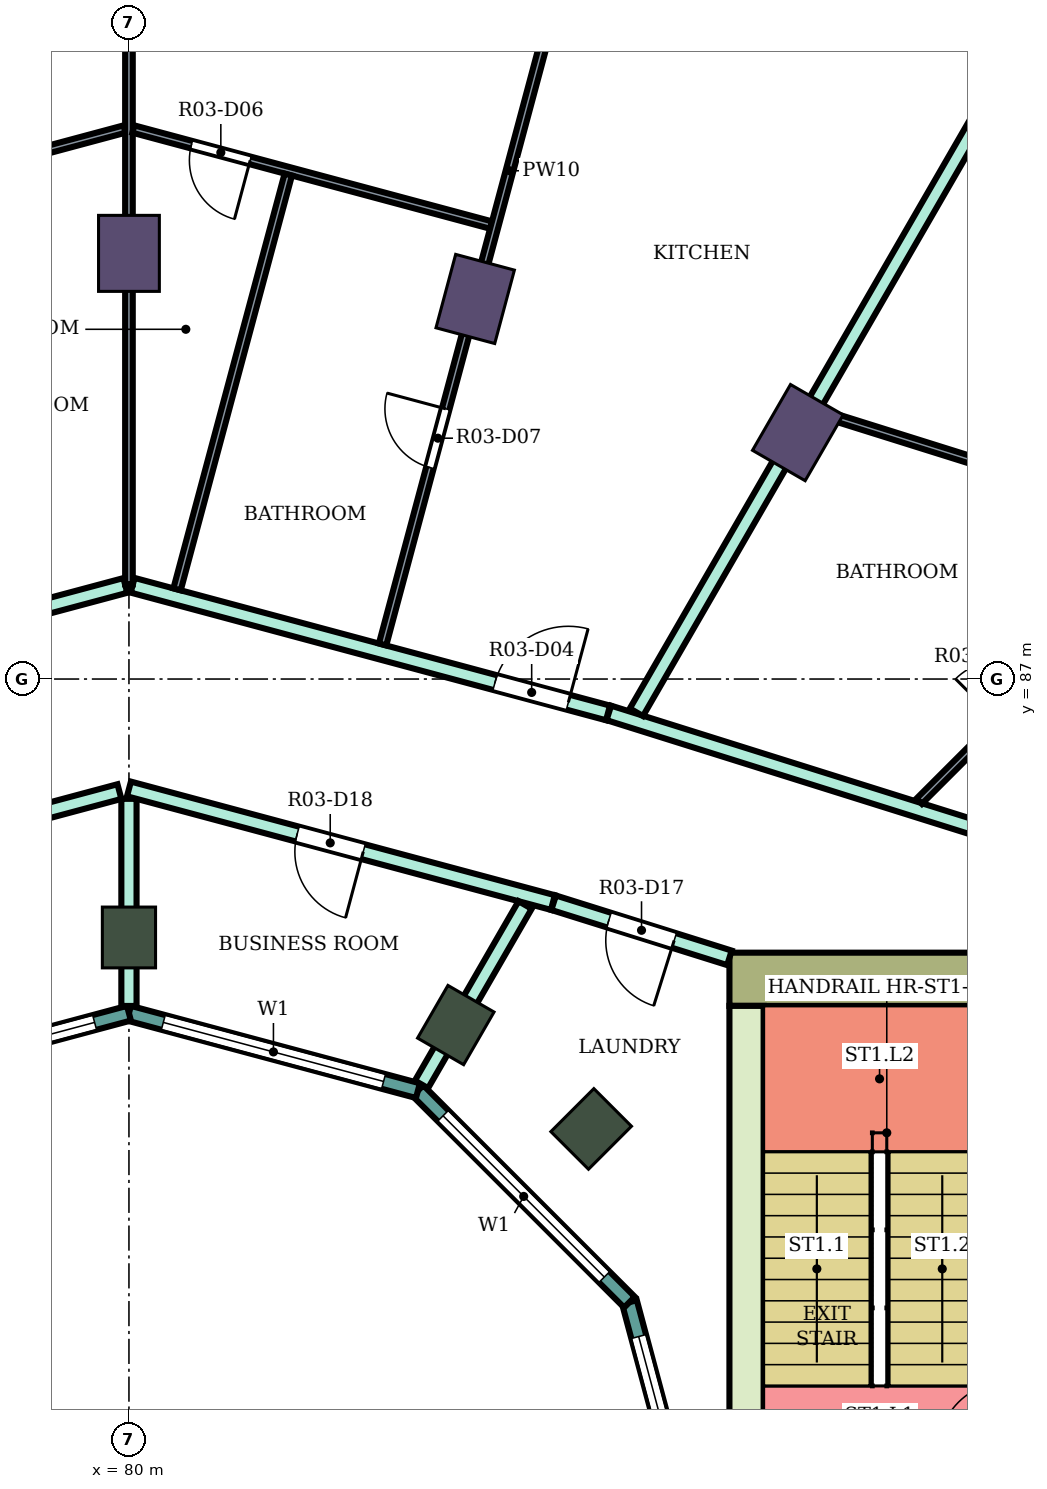
"""IFC4 building model, lengths in metres.
Left out: names, types, materials, properties, quantities, classifications, styles, units other than length and angle.
Written with IfcOpenShell. Run it as: python <this file> out.ifc"""

import sys

from ifc_helpers import new_model, si_unit, direction, frame, frame_2d, origin, origin_2d, place, context, subcontext, project, spatial, rectangle, extrude, element, fill, save


model = new_model("IFC4")
c1 = context("Model", 3, precision=1e-05, world=origin(), true_north=direction((0.0, 1.0)))
c2 = subcontext(c1, "Body", "Model", "MODEL_VIEW")
j1 = project(units=[si_unit("LENGTHUNIT", "METRE"), si_unit("PLANEANGLEUNIT", "RADIAN")], contexts=[c1])
p1 = place(None, origin())
s1 = spatial("IfcSite", under=j1, at=p1, CompositionType="ELEMENT")
p2 = place(p1, origin())
s2 = spatial("IfcBuilding", under=s1, at=p2, CompositionType="ELEMENT")
p3 = place(p2, frame((0.0, 0.0, 190.5)))
s3 = spatial("IfcBuildingStorey", under=s2, at=p3, CompositionType="ELEMENT", Elevation=190.5)
for number, where, z_axis, x_axis in (
    (1, (88.8, 90.242, 0.0), (0.0, 0.0, 1.0), (0.5, 0.866, 0.0)),
    (2, (84.555, 92.0, 0.0), (0.0, 0.0, 1.0), (0.259, 0.966, 0.0)),
    (3, (80.0, 92.6, 0.0), (0.0, 0.0, 1.0), (0.0, 1.0, 0.0)),
):
    element("IfcColumn", number, at=place(p3, frame(where, z_axis=z_axis, x_axis=x_axis)), inside=s3, PredefinedType="COLUMN", context=c2, shape_type="SweptSolid", body=[
        extrude(rectangle(XDim=1.0, YDim=0.8, at=origin_2d()), origin(), (0.0, 0.0, 1.0), 4.1),
    ])
for number, where, z_axis, x_axis in (
    (4, (86.081, 81.081, 0.0), (0.0, 0.0, 1.0), (0.707, 0.707, 0.0)),
    (5, (84.3, 82.448, 0.0), (0.0, 0.0, 1.0), (0.5, 0.866, 0.0)),
    (6, (80.0, 83.6, 0.0), (0.0, 0.0, 1.0), (0.0, 1.0, 0.0)),
):
    element("IfcColumn", number, at=place(p3, frame(where, z_axis=z_axis, x_axis=x_axis)), inside=s3, PredefinedType="COLUMN", context=c2, shape_type="SweptSolid", body=[
        extrude(rectangle(XDim=0.8, YDim=0.7, at=origin_2d()), origin(), (0.0, 0.0, 1.0), 4.1),
    ])
p4 = place(p3, frame((87.9, 83.05, 0.0), z_axis=(0.0, 0.0, 1.0), x_axis=(1.0, 0.0, 0.0)))
e7 = element("IfcWall", 7, at=p4, inside=s3, PredefinedType="SHEAR", context=c2, shape_type="SweptSolid", body=[
    extrude(rectangle(XDim=14.8, YDim=0.7, at=frame_2d((7.4, 0.0))), origin(), (0.0, 0.0, 1.0), 3.78),
])
p5 = place(p4, frame((4.2, 0.0, 0.0)))
e8 = element("IfcOpeningElement", 8, at=p5, cuts=e7, PredefinedType="OPENING", context=c2, shape_type="SweptSolid", body=[
    extrude(rectangle(XDim=2.4, YDim=2.4, at=frame_2d((1.2, 1.2))), frame((0.0, 0.36, 0.0), z_axis=(0.0, -1.0, 0.0), x_axis=(1.0, 0.0, 0.0)), (0.0, 0.0, 1.0), 0.72),
])
p6 = place(p3, frame((88.125, 75.0, 0.0), z_axis=(0.0, 0.0, 1.0), x_axis=(0.0, 1.0, 0.0)))
e9 = element("IfcWall", 9, at=p6, inside=s3, PredefinedType="SHEAR", context=c2, shape_type="SweptSolid", body=[
    extrude(rectangle(XDim=7.7, YDim=0.45, at=frame_2d((3.85, 0.0))), origin(), (0.0, 0.0, 1.0), 3.78),
])
p7 = place(p3, frame((87.604, 75.0, 0.0), z_axis=(0.0, 0.0, 1.0), x_axis=(-0.258789828301, 0.965933654434, 0.0)))
e10 = element("IfcWall", 10, at=p7, inside=s3, PredefinedType="NOTDEFINED", context=c2, shape_type="SweptSolid", body=[
    extrude(rectangle(XDim=3.936, YDim=0.2, at=frame_2d((1.968, 0.0))), origin(), (0.0, 0.0, 1.0), 4.1),
])
p8 = place(p7, frame((0.468, 0.0, 0.9)))
e11 = element("IfcOpeningElement", 11, at=p8, cuts=e10, PredefinedType="OPENING", context=c2, shape_type="SweptSolid", body=[
    extrude(rectangle(XDim=3.0, YDim=2.3, at=frame_2d((1.5, 1.15))), frame((0.0, 0.11, 0.0), z_axis=(0.0, -1.0, 0.0), x_axis=(1.0, 0.0, 0.0)), (0.0, 0.0, 1.0), 0.22),
])
p9 = place(p3, frame((86.585, 78.802, 0.0), z_axis=(0.0, 0.0, 1.0), x_axis=(-0.707106781187, 0.707106781187, 0.0)))
e12 = element("IfcWall", 12, at=p9, inside=s3, PredefinedType="NOTDEFINED", context=c2, shape_type="SweptSolid", body=[
    extrude(rectangle(XDim=3.936, YDim=0.2, at=frame_2d((1.968, 0.0))), origin(), (0.0, 0.0, 1.0), 4.1),
])
p10 = place(p9, frame((0.468, 0.0, 0.9)))
e13 = element("IfcOpeningElement", 13, at=p10, cuts=e12, PredefinedType="OPENING", context=c2, shape_type="SweptSolid", body=[
    extrude(rectangle(XDim=3.0, YDim=2.3, at=frame_2d((1.5, 1.15))), frame((0.0, 0.11, 0.0), z_axis=(0.0, -1.0, 0.0), x_axis=(1.0, 0.0, 0.0)), (0.0, 0.0, 1.0), 0.22),
])
p11 = place(p3, frame((83.802, 81.585, 0.0), z_axis=(0.0, 0.0, 1.0), x_axis=(-0.965933654434, 0.258789828301, 0.0)))
e14 = element("IfcWall", 14, at=p11, inside=s3, PredefinedType="NOTDEFINED", context=c2, shape_type="SweptSolid", body=[
    extrude(rectangle(XDim=3.936, YDim=0.2, at=frame_2d((1.968, 0.0))), origin(), (0.0, 0.0, 1.0), 4.1),
])
p12 = place(p11, frame((0.468, 0.0, 0.9)))
e15 = element("IfcOpeningElement", 15, at=p12, cuts=e14, PredefinedType="OPENING", context=c2, shape_type="SweptSolid", body=[
    extrude(rectangle(XDim=3.0, YDim=2.3, at=frame_2d((1.5, 1.15))), frame((0.0, 0.11, 0.0), z_axis=(0.0, -1.0, 0.0), x_axis=(1.0, 0.0, 0.0)), (0.0, 0.0, 1.0), 0.22),
])
p13 = place(p3, frame((80.0, 82.604, 0.0), z_axis=(0.0, 0.0, 1.0), x_axis=(-0.965933654434, -0.258789828301, 0.0)))
e16 = element("IfcWall", 16, at=p13, inside=s3, PredefinedType="NOTDEFINED", context=c2, shape_type="SweptSolid", body=[
    extrude(rectangle(XDim=3.936, YDim=0.2, at=frame_2d((1.968, 0.0))), origin(), (0.0, 0.0, 1.0), 4.1),
])
p14 = place(p13, frame((0.468, 0.0, 0.9)))
e17 = element("IfcOpeningElement", 17, at=p14, cuts=e16, PredefinedType="OPENING", context=c2, shape_type="SweptSolid", body=[
    extrude(rectangle(XDim=3.0, YDim=2.3, at=frame_2d((1.5, 1.15))), frame((0.0, 0.11, 0.0), z_axis=(0.0, -1.0, 0.0), x_axis=(1.0, 0.0, 0.0)), (0.0, 0.0, 1.0), 0.22),
])
p15 = place(p3, frame((73.687, 86.554, 0.0), z_axis=(0.0, 0.0, 1.0), x_axis=(0.965992724769, 0.258569247387, 0.0)))
e18 = element("IfcWall", 18, at=p15, inside=s3, PredefinedType="PARTITIONING", context=c2, shape_type="SweptSolid", body=[
    extrude(rectangle(XDim=6.486, YDim=0.2, at=frame_2d((3.243, 0.0))), origin(), (0.0, 0.0, 1.0), 3.65),
])
p16 = place(p15, frame((0.214, 0.0, 0.0)))
e19 = element("IfcOpeningElement", 19, at=p16, cuts=e18, PredefinedType="OPENING", context=c2, shape_type="SweptSolid", body=[
    extrude(rectangle(XDim=1.0, YDim=2.1, at=frame_2d((0.5, 1.05))), frame((0.0, 0.11, 0.0), z_axis=(0.0, -1.0, 0.0), x_axis=(1.0, 0.0, 0.0)), (0.0, 0.0, 1.0), 0.22),
])
p17 = place(p3, frame((74.413, 84.057, 0.0), z_axis=(0.0, 0.0, 1.0), x_axis=(0.965972135939, 0.258646153246, 0.0)))
e20 = element("IfcWall", 20, at=p17, inside=s3, PredefinedType="PARTITIONING", context=c2, shape_type="SweptSolid", body=[
    extrude(rectangle(XDim=5.654, YDim=0.2, at=frame_2d((2.827, 0.0))), origin(), (0.0, 0.0, 1.0), 3.65),
])
p18 = place(p17, frame((2.593, 0.0, 0.0)))
e21 = element("IfcOpeningElement", 21, at=p18, cuts=e20, PredefinedType="OPENING", context=c2, shape_type="SweptSolid", body=[
    extrude(rectangle(XDim=0.9, YDim=2.1, at=frame_2d((0.45, 1.05))), frame((0.0, 0.11, 0.0), z_axis=(0.0, -1.0, 0.0), x_axis=(1.0, 0.0, 0.0)), (0.0, 0.0, 1.0), 0.22),
])
p19 = place(p3, frame((80.0, 82.699, 0.0), z_axis=(0.0, 0.0, 1.0), x_axis=(0.0, 1.0, 0.0)))
e22 = element("IfcWall", 22, at=p19, inside=s3, PredefinedType="PARTITIONING", context=c2, shape_type="SweptSolid", body=[
    extrude(rectangle(XDim=2.725, YDim=0.2, at=frame_2d((1.363, 0.0))), origin(), (0.0, 0.0, 1.0), 3.65),
])
p20 = place(p3, frame((80.0, 85.554, 0.0), z_axis=(0.0, 0.0, 1.0), x_axis=(0.965928989968, -0.258807237802, 0.0)))
e23 = element("IfcWall", 23, at=p20, inside=s3, PredefinedType="PARTITIONING", context=c2, shape_type="SweptSolid", body=[
    extrude(rectangle(XDim=5.774, YDim=0.2, at=frame_2d((2.887, 0.0))), origin(), (0.0, 0.0, 1.0), 3.65),
])
p21 = place(p20, frame((2.292, 0.0, 0.0)))
e24 = element("IfcOpeningElement", 24, at=p21, cuts=e23, PredefinedType="OPENING", context=c2, shape_type="SweptSolid", body=[
    extrude(rectangle(XDim=0.9, YDim=2.1, at=frame_2d((0.45, 1.05))), frame((0.0, 0.11, 0.0), z_axis=(0.0, -1.0, 0.0), x_axis=(1.0, 0.0, 0.0)), (0.0, 0.0, 1.0), 0.22),
])
p22 = place(p3, frame((80.048, 88.233, 0.0), z_axis=(0.0, 0.0, 1.0), x_axis=(0.965787353661, -0.259335280109, 0.0)))
e25 = element("IfcWall", 25, at=p22, inside=s3, PredefinedType="PARTITIONING", context=c2, shape_type="SweptSolid", body=[
    extrude(rectangle(XDim=6.476, YDim=0.2, at=frame_2d((3.238, 0.0))), origin(), (0.0, 0.0, 1.0), 3.65),
])
p23 = place(p22, frame((4.936, 0.0, 0.0)))
e26 = element("IfcOpeningElement", 26, at=p23, cuts=e25, PredefinedType="OPENING", context=c2, shape_type="SweptSolid", body=[
    extrude(rectangle(XDim=1.0, YDim=2.1, at=frame_2d((0.5, 1.05))), frame((0.0, 0.11, 0.0), z_axis=(0.0, -1.0, 0.0), x_axis=(1.0, 0.0, 0.0)), (0.0, 0.0, 1.0), 0.22),
])
p24 = place(p3, frame((83.849, 81.667, 0.0), z_axis=(0.0, 0.0, 1.0), x_axis=(0.500117899823, 0.865957323588, 0.0)))
e27 = element("IfcWall", 27, at=p24, inside=s3, PredefinedType="PARTITIONING", context=c2, shape_type="SweptSolid", body=[
    extrude(rectangle(XDim=2.725, YDim=0.2, at=frame_2d((1.363, 0.0))), origin(), (0.0, 0.0, 1.0), 3.65),
])
p25 = place(p3, frame((85.587, 84.057, 0.0), z_axis=(0.0, 0.0, 1.0), x_axis=(0.954239513179, -0.299043393987, 0.0)))
e28 = element("IfcWall", 28, at=p25, inside=s3, PredefinedType="PARTITIONING", context=c2, shape_type="SweptSolid", body=[
    extrude(rectangle(XDim=2.424, YDim=0.2, at=frame_2d((1.212, 0.0))), origin(), (0.0, 0.0, 1.0), 3.65),
])
p26 = place(p25, frame((0.762, 0.0, 0.0)))
e29 = element("IfcOpeningElement", 29, at=p26, cuts=e28, PredefinedType="OPENING", context=c2, shape_type="SweptSolid", body=[
    extrude(rectangle(XDim=0.9, YDim=2.1, at=frame_2d((0.45, 1.05))), frame((0.0, 0.11, 0.0), z_axis=(0.0, -1.0, 0.0), x_axis=(1.0, 0.0, 0.0)), (0.0, 0.0, 1.0), 0.22),
])
p27 = place(p3, frame((86.313, 86.554, 0.0), z_axis=(0.0, 0.0, 1.0), x_axis=(0.954081217458, -0.299548043717, 0.0)))
e30 = element("IfcWall", 30, at=p27, inside=s3, PredefinedType="PARTITIONING", context=c2, shape_type="SweptSolid", body=[
    extrude(rectangle(XDim=5.721, YDim=0.2, at=frame_2d((2.86, 0.0))), origin(), (0.0, 0.0, 1.0), 3.65),
])
p28 = place(p3, frame((86.676, 86.563, 0.0), z_axis=(0.0, 0.0, 1.0), x_axis=(0.500130524836, 0.865950032119, 0.0)))
e31 = element("IfcWall", 31, at=p28, inside=s3, PredefinedType="PARTITIONING", context=c2, shape_type="SweptSolid", body=[
    extrude(rectangle(XDim=12.446, YDim=0.2, at=frame_2d((6.223, 0.0))), origin(), (0.0, 0.0, 1.0), 3.65),
])
p29 = place(p3, frame((75.295, 92.989, 0.0), z_axis=(0.0, 0.0, 1.0), x_axis=(0.965829517501, 0.259178207271, 0.0)))
e32 = element("IfcWall", 32, at=p29, inside=s3, PredefinedType="PARTITIONING", context=c2, shape_type="SweptSolid", body=[
    extrude(rectangle(XDim=4.812, YDim=0.1, at=frame_2d((2.406, 0.0))), origin(), (0.0, 0.0, 1.0), 3.65),
])
p30 = place(p29, frame((1.981, 0.0, 0.0)))
e33 = element("IfcOpeningElement", 33, at=p30, cuts=e32, PredefinedType="OPENING", context=c2, shape_type="SweptSolid", body=[
    extrude(rectangle(XDim=0.8, YDim=2.1, at=frame_2d((0.4, 1.05))), frame((0.0, 0.06, 0.0), z_axis=(0.0, -1.0, 0.0), x_axis=(1.0, 0.0, 0.0)), (0.0, 0.0, 1.0), 0.12),
])
p31 = place(p3, frame((80.0, 88.246, 0.0), z_axis=(0.0, 0.0, 1.0), x_axis=(0.0, 1.0, 0.0)))
e34 = element("IfcWall", 34, at=p31, inside=s3, PredefinedType="PARTITIONING", context=c2, shape_type="SweptSolid", body=[
    extrude(rectangle(XDim=9.954, YDim=0.1, at=frame_2d((4.977, 0.0))), origin(), (0.0, 0.0, 1.0), 3.65),
])
p32 = place(p31, frame((7.354, 0.0, 0.0)))
e35 = element("IfcOpeningElement", 35, at=p32, cuts=e34, PredefinedType="OPENING", context=c2, shape_type="SweptSolid", body=[
    extrude(rectangle(XDim=0.9, YDim=2.1, at=frame_2d((0.45, 1.05))), frame((0.0, 0.06, 0.0), z_axis=(0.0, -1.0, 0.0), x_axis=(1.0, 0.0, 0.0)), (0.0, 0.0, 1.0), 0.12),
])
p33 = place(p3, frame((80.058, 94.235, 0.0), z_axis=(0.0, 0.0, 1.0), x_axis=(0.965831212389, -0.259171891173, 0.0)))
e36 = element("IfcWall", 36, at=p33, inside=s3, PredefinedType="PARTITIONING", context=c2, shape_type="SweptSolid", body=[
    extrude(rectangle(XDim=4.872, YDim=0.1, at=frame_2d((2.436, 0.0))), origin(), (0.0, 0.0, 1.0), 3.65),
])
p34 = place(p33, frame((0.792, 0.0, 0.0)))
e37 = element("IfcOpeningElement", 37, at=p34, cuts=e36, PredefinedType="OPENING", context=c2, shape_type="SweptSolid", body=[
    extrude(rectangle(XDim=0.8, YDim=2.1, at=frame_2d((0.4, 1.05))), frame((0.0, 0.06, 0.0), z_axis=(0.0, -1.0, 0.0), x_axis=(1.0, 0.0, 0.0)), (0.0, 0.0, 1.0), 0.12),
])
p35 = place(p3, frame((80.633, 88.18, 0.0), z_axis=(0.0, 0.0, 1.0), x_axis=(0.25898304477, 0.965881867788, 0.0)))
e38 = element("IfcWall", 38, at=p35, inside=s3, PredefinedType="PARTITIONING", context=c2, shape_type="SweptSolid", body=[
    extrude(rectangle(XDim=5.65, YDim=0.1, at=frame_2d((2.825, 0.0))), origin(), (0.0, 0.0, 1.0), 3.65),
])
p36 = place(p3, frame((83.337, 87.455, 0.0), z_axis=(0.0, 0.0, 1.0), x_axis=(0.258861232071, 0.965914521337, 0.0)))
e39 = element("IfcWall", 39, at=p36, inside=s3, PredefinedType="PARTITIONING", context=c2, shape_type="SweptSolid", body=[
    extrude(rectangle(XDim=12.904, YDim=0.1, at=frame_2d((6.452, 0.0))), origin(), (0.0, 0.0, 1.0), 3.65),
])
p37 = place(p36, frame((9.227, 0.0, 0.0)))
e40 = element("IfcOpeningElement", 40, at=p37, cuts=e39, PredefinedType="OPENING", context=c2, shape_type="SweptSolid", body=[
    extrude(rectangle(XDim=0.9, YDim=2.1, at=frame_2d((0.45, 1.05))), frame((0.0, 0.06, 0.0), z_axis=(0.0, -1.0, 0.0), x_axis=(1.0, 0.0, 0.0)), (0.0, 0.0, 1.0), 0.12),
])
p38 = place(p36, frame((2.409, 0.0, 0.0)))
e41 = element("IfcOpeningElement", 41, at=p38, cuts=e39, PredefinedType="OPENING", context=c2, shape_type="SweptSolid", body=[
    extrude(rectangle(XDim=0.8, YDim=2.1, at=frame_2d((0.4, 1.05))), frame((0.0, 0.06, 0.0), z_axis=(0.0, -1.0, 0.0), x_axis=(1.0, 0.0, 0.0)), (0.0, 0.0, 1.0), 0.12),
])
p39 = place(p3, frame((89.078, 90.508, 0.0), z_axis=(0.0, 0.0, 1.0), x_axis=(0.954199699612, -0.299170408398, 0.0)))
e42 = element("IfcWall", 42, at=p39, inside=s3, PredefinedType="PARTITIONING", context=c2, shape_type="SweptSolid", body=[
    extrude(rectangle(XDim=5.06, YDim=0.1, at=frame_2d((2.53, 0.0))), origin(), (0.0, 0.0, 1.0), 3.65),
])
p40 = place(p3, frame((90.397, 85.393, 0.0), z_axis=(0.0, 0.0, 1.0), x_axis=(0.707264750546, 0.706948776529, 0.0)))
e43 = element("IfcWall", 43, at=p40, inside=s3, PredefinedType="PARTITIONING", context=c2, shape_type="SweptSolid", body=[
    extrude(rectangle(XDim=8.499, YDim=0.1, at=frame_2d((4.25, 0.0))), origin(), (0.0, 0.0, 1.0), 3.65),
])
p41 = place(p40, frame((5.857, 0.0, 0.0)))
e44 = element("IfcOpeningElement", 44, at=p41, cuts=e43, PredefinedType="OPENING", context=c2, shape_type="SweptSolid", body=[
    extrude(rectangle(XDim=0.9, YDim=2.1, at=frame_2d((0.45, 1.05))), frame((0.0, 0.06, 0.0), z_axis=(0.0, -1.0, 0.0), x_axis=(1.0, 0.0, 0.0)), (0.0, 0.0, 1.0), 0.12),
])
p42 = place(p40, frame((1.476, 0.0, 0.0)))
e45 = element("IfcOpeningElement", 45, at=p42, cuts=e43, PredefinedType="OPENING", context=c2, shape_type="SweptSolid", body=[
    extrude(rectangle(XDim=0.8, YDim=2.1, at=frame_2d((0.4, 1.05))), frame((0.0, 0.06, 0.0), z_axis=(0.0, -1.0, 0.0), x_axis=(1.0, 0.0, 0.0)), (0.0, 0.0, 1.0), 0.12),
])
p43 = place(p8, origin())
e46 = element("IfcWindow", 46, at=p43, inside=s3, PartitioningType="SINGLE_PANEL", PredefinedType="WINDOW", context=c2, shape_type="SweptSolid", body=[
    extrude(rectangle(XDim=3.0, YDim=2.3, at=frame_2d((1.5, 1.15))), frame((0.0, 0.03, 0.0), z_axis=(0.0, -1.0, 0.0), x_axis=(1.0, 0.0, 0.0)), (0.0, 0.0, 1.0), 0.06),
])
fill(e11, e46)
p44 = place(p10, origin())
e47 = element("IfcWindow", 47, at=p44, inside=s3, PartitioningType="SINGLE_PANEL", PredefinedType="WINDOW", context=c2, shape_type="SweptSolid", body=[
    extrude(rectangle(XDim=3.0, YDim=2.3, at=frame_2d((1.5, 1.15))), frame((0.0, 0.03, 0.0), z_axis=(0.0, -1.0, 0.0), x_axis=(1.0, 0.0, 0.0)), (0.0, 0.0, 1.0), 0.06),
])
fill(e13, e47)
p45 = place(p12, origin())
e48 = element("IfcWindow", 48, at=p45, inside=s3, PartitioningType="SINGLE_PANEL", PredefinedType="WINDOW", context=c2, shape_type="SweptSolid", body=[
    extrude(rectangle(XDim=3.0, YDim=2.3, at=frame_2d((1.5, 1.15))), frame((0.0, 0.03, 0.0), z_axis=(0.0, -1.0, 0.0), x_axis=(1.0, 0.0, 0.0)), (0.0, 0.0, 1.0), 0.06),
])
fill(e15, e48)
p46 = place(p14, origin())
e49 = element("IfcWindow", 49, at=p46, inside=s3, PartitioningType="SINGLE_PANEL", PredefinedType="WINDOW", context=c2, shape_type="SweptSolid", body=[
    extrude(rectangle(XDim=3.0, YDim=2.3, at=frame_2d((1.5, 1.15))), frame((0.0, 0.03, 0.0), z_axis=(0.0, -1.0, 0.0), x_axis=(1.0, 0.0, 0.0)), (0.0, 0.0, 1.0), 0.06),
])
fill(e17, e49)
p47 = place(p23, origin())
e50 = element("IfcDoor", 50, at=p47, inside=s3, OperationType="SINGLE_SWING_RIGHT", PredefinedType="DOOR", context=c2, shape_type="SweptSolid", body=[
    extrude(rectangle(XDim=1.0, YDim=2.1, at=frame_2d((0.5, 1.05))), frame((0.0, 0.025, 0.0), z_axis=(0.0, -1.0, 0.0), x_axis=(1.0, 0.0, 0.0)), (0.0, 0.0, 1.0), 0.05),
])
fill(e26, e50)
p48 = place(p34, frame((0.8, 0.0, 0.0), z_axis=(0.0, 0.0, 1.0), x_axis=(-1.0, 0.0, 0.0)))
e51 = element("IfcDoor", 51, at=p48, inside=s3, OperationType="SINGLE_SWING_LEFT", PredefinedType="DOOR", context=c2, shape_type="SweptSolid", body=[
    extrude(rectangle(XDim=0.8, YDim=2.1, at=frame_2d((0.4, 1.05))), frame((0.0, 0.025, 0.0), z_axis=(0.0, -1.0, 0.0), x_axis=(1.0, 0.0, 0.0)), (0.0, 0.0, 1.0), 0.05),
])
fill(e37, e51)
p49 = place(p38, origin())
e52 = element("IfcDoor", 52, at=p49, inside=s3, OperationType="SINGLE_SWING_RIGHT", PredefinedType="DOOR", context=c2, shape_type="SweptSolid", body=[
    extrude(rectangle(XDim=0.8, YDim=2.1, at=frame_2d((0.4, 1.05))), frame((0.0, 0.025, 0.0), z_axis=(0.0, -1.0, 0.0), x_axis=(1.0, 0.0, 0.0)), (0.0, 0.0, 1.0), 0.05),
])
fill(e41, e52)
p50 = place(p26, frame((0.9, 0.0, 0.0), z_axis=(0.0, 0.0, 1.0), x_axis=(-1.0, 0.0, 0.0)))
e53 = element("IfcDoor", 53, at=p50, inside=s3, OperationType="SINGLE_SWING_LEFT", PredefinedType="DOOR", context=c2, shape_type="SweptSolid", body=[
    extrude(rectangle(XDim=0.9, YDim=2.1, at=frame_2d((0.45, 1.05))), frame((0.0, 0.025, 0.0), z_axis=(0.0, -1.0, 0.0), x_axis=(1.0, 0.0, 0.0)), (0.0, 0.0, 1.0), 0.05),
])
fill(e29, e53)
p51 = place(p21, frame((0.9, 0.0, 0.0), z_axis=(0.0, 0.0, 1.0), x_axis=(-1.0, 0.0, 0.0)))
e54 = element("IfcDoor", 54, at=p51, inside=s3, OperationType="SINGLE_SWING_LEFT", PredefinedType="DOOR", context=c2, shape_type="SweptSolid", body=[
    extrude(rectangle(XDim=0.9, YDim=2.1, at=frame_2d((0.45, 1.05))), frame((0.0, 0.025, 0.0), z_axis=(0.0, -1.0, 0.0), x_axis=(1.0, 0.0, 0.0)), (0.0, 0.0, 1.0), 0.05),
])
fill(e24, e54)
save(model, sys.argv[1])
